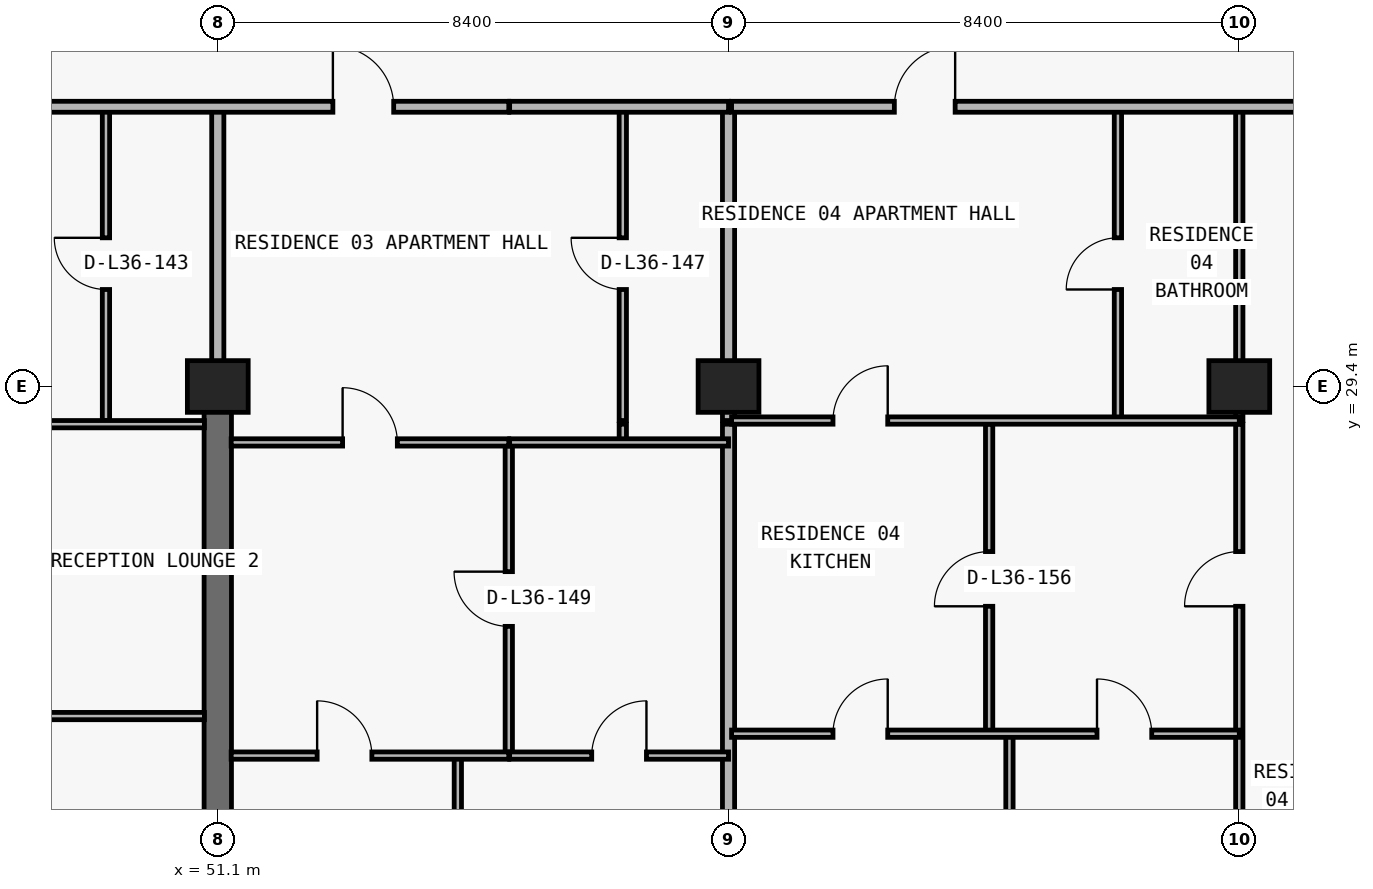
"""IFC4 building model, lengths in metres.
Left out: names, types, materials, properties, quantities, classifications, styles, units other than length and angle.
Written with IfcOpenShell. Run it as: python <this file> out.ifc"""

import sys

from ifc_helpers import new_model, si_unit, direction, frame, frame_2d, origin, origin_2d, place, context, subcontext, project, spatial, rectangle, extrude, element, fill, save


model = new_model("IFC4")
c1 = context("Model", 3, precision=1e-05, world=origin(), true_north=direction((0.0, 1.0)))
c2 = subcontext(c1, "Body", "Model", "MODEL_VIEW")
j1 = project(units=[si_unit("LENGTHUNIT", "METRE"), si_unit("PLANEANGLEUNIT", "RADIAN")], contexts=[c1])
p1 = place(None, origin())
s1 = spatial("IfcSite", under=j1, at=p1, CompositionType="ELEMENT")
p2 = place(p1, origin())
s2 = spatial("IfcBuilding", under=s1, at=p2, CompositionType="ELEMENT")
p3 = place(p2, frame((0.0, 0.0, 132.3)))
s3 = spatial("IfcBuildingStorey", under=s2, at=p3, CompositionType="ELEMENT", Elevation=132.3)
for number, where, z_axis, x_axis in (
    (1, (51.1, 29.4, 0.0), (0.0, 0.0, 1.0), (1.0, 0.0, 0.0)),
    (2, (59.5, 29.4, 0.0), (0.0, 0.0, 1.0), (1.0, 0.0, 0.0)),
    (3, (67.9, 29.4, 0.0), (0.0, 0.0, 1.0), (1.0, 0.0, 0.0)),
):
    element("IfcColumn", number, at=place(p3, frame(where, z_axis=z_axis, x_axis=x_axis)), inside=s3, PredefinedType="COLUMN", context=c2, shape_type="SweptSolid", body=[
        extrude(rectangle(XDim=1.0, YDim=0.85, at=origin_2d()), origin(), (0.0, 0.0, 1.0), 3.05),
    ])
p4 = place(p3, frame((51.1, 20.8, 0.0), z_axis=(0.0, 0.0, 1.0), x_axis=(0.0, 1.0, 0.0)))
e4 = element("IfcWall", 4, at=p4, inside=s3, PredefinedType="SHEAR", context=c2, shape_type="SweptSolid", body=[
    extrude(rectangle(XDim=8.6, YDim=0.45, at=frame_2d((4.3, 0.0))), origin(), (0.0, 0.0, 1.0), 3.05),
])
p5 = place(p3, frame((49.261, 28.84, 0.0), z_axis=(0.0, 0.0, 1.0), x_axis=(0.0, 1.0, 0.0)))
e5 = element("IfcWall", 5, at=p5, inside=s3, PredefinedType="PARTITIONING", context=c2, shape_type="SweptSolid", body=[
    extrude(rectangle(XDim=5.16, YDim=0.12, at=frame_2d((2.58, 0.0))), origin(), (0.0, 0.0, 1.0), 3.05),
])
p6 = place(p5, frame((2.155, 0.0, 0.0)))
e6 = element("IfcOpeningElement", 6, at=p6, cuts=e5, PredefinedType="OPENING", context=c2, shape_type="SweptSolid", body=[
    extrude(rectangle(XDim=0.85, YDim=2.1, at=frame_2d((0.425, 1.05))), frame((0.0, 0.07, 0.0), z_axis=(0.0, -1.0, 0.0), x_axis=(1.0, 0.0, 0.0)), (0.0, 0.0, 1.0), 0.14),
])
p7 = place(p3, frame((51.1, 29.405, 0.0), z_axis=(0.0, 0.0, 1.0), x_axis=(0.0, 1.0, 0.0)))
e7 = element("IfcWall", 7, at=p7, inside=s3, PredefinedType="PARTITIONING", context=c2, shape_type="SweptSolid", body=[
    extrude(rectangle(XDim=4.595, YDim=0.2, at=frame_2d((2.297, 0.0))), origin(), (0.0, 0.0, 1.0), 2.335),
])
p8 = place(p3, frame((55.048, 8.84, 0.0), z_axis=(0.0, 0.0, 1.0), x_axis=(0.0, 1.0, 0.0)))
e8 = element("IfcWall", 8, at=p8, inside=s3, PredefinedType="PARTITIONING", context=c2, shape_type="SweptSolid", body=[
    extrude(rectangle(XDim=14.49, YDim=0.12, at=frame_2d((7.245, 0.0))), origin(), (0.0, 0.0, 1.0), 3.05),
])
p9 = place(p3, frame((55.886, 23.33, 0.0), z_axis=(0.0, 0.0, 1.0), x_axis=(0.0, 1.0, 0.0)))
e9 = element("IfcWall", 9, at=p9, inside=s3, PredefinedType="PARTITIONING", context=c2, shape_type="SweptSolid", body=[
    extrude(rectangle(XDim=5.15, YDim=0.12, at=frame_2d((2.575, 0.0))), origin(), (0.0, 0.0, 1.0), 3.05),
])
p10 = place(p9, frame((2.125, 0.0, 0.0)))
e10 = element("IfcOpeningElement", 10, at=p10, cuts=e9, PredefinedType="OPENING", context=c2, shape_type="SweptSolid", body=[
    extrude(rectangle(XDim=0.9, YDim=2.15, at=frame_2d((0.45, 1.075))), frame((0.0, 0.07, 0.0), z_axis=(0.0, -1.0, 0.0), x_axis=(1.0, 0.0, 0.0)), (0.0, 0.0, 1.0), 0.14),
])
p11 = place(p3, frame((57.761, 28.48, 0.0), z_axis=(0.0, 0.0, 1.0), x_axis=(0.0, 1.0, 0.0)))
e11 = element("IfcWall", 11, at=p11, inside=s3, PredefinedType="PARTITIONING", context=c2, shape_type="SweptSolid", body=[
    extrude(rectangle(XDim=0.3, YDim=0.12, at=frame_2d((0.15, 0.0))), origin(), (0.0, 0.0, 1.0), 3.05),
])
p12 = place(p3, frame((57.761, 28.84, 0.0), z_axis=(0.0, 0.0, 1.0), x_axis=(0.0, 1.0, 0.0)))
e12 = element("IfcWall", 12, at=p12, inside=s3, PredefinedType="PARTITIONING", context=c2, shape_type="SweptSolid", body=[
    extrude(rectangle(XDim=5.16, YDim=0.12, at=frame_2d((2.58, 0.0))), origin(), (0.0, 0.0, 1.0), 3.05),
])
p13 = place(p12, frame((2.155, 0.0, 0.0)))
e13 = element("IfcOpeningElement", 13, at=p13, cuts=e12, PredefinedType="OPENING", context=c2, shape_type="SweptSolid", body=[
    extrude(rectangle(XDim=0.85, YDim=2.1, at=frame_2d((0.425, 1.05))), frame((0.0, 0.07, 0.0), z_axis=(0.0, -1.0, 0.0), x_axis=(1.0, 0.0, 0.0)), (0.0, 0.0, 1.0), 0.14),
])
p14 = place(p3, frame((59.5, 8.84, 0.0), z_axis=(0.0, 0.0, 1.0), x_axis=(0.0, 1.0, 0.0)))
e14 = element("IfcWall", 14, at=p14, inside=s3, PredefinedType="PARTITIONING", context=c2, shape_type="SweptSolid", body=[
    extrude(rectangle(XDim=19.94, YDim=0.2, at=frame_2d((9.97, 0.0))), origin(), (0.0, 0.0, 1.0), 2.174),
])
p15 = place(p3, frame((59.5, 28.84, 0.0), z_axis=(0.0, 0.0, 1.0), x_axis=(0.0, 1.0, 0.0)))
e15 = element("IfcWall", 15, at=p15, inside=s3, PredefinedType="PARTITIONING", context=c2, shape_type="SweptSolid", body=[
    extrude(rectangle(XDim=5.16, YDim=0.2, at=frame_2d((2.58, 0.0))), origin(), (0.0, 0.0, 1.0), 2.174),
])
p16 = place(p3, frame((63.786, 23.69, 0.0), z_axis=(0.0, 0.0, 1.0), x_axis=(0.0, 1.0, 0.0)))
e16 = element("IfcWall", 16, at=p16, inside=s3, PredefinedType="PARTITIONING", context=c2, shape_type="SweptSolid", body=[
    extrude(rectangle(XDim=5.09, YDim=0.12, at=frame_2d((2.545, 0.0))), origin(), (0.0, 0.0, 1.0), 3.05),
])
p17 = place(p16, frame((2.095, 0.0, 0.0)))
e17 = element("IfcOpeningElement", 17, at=p17, cuts=e16, PredefinedType="OPENING", context=c2, shape_type="SweptSolid", body=[
    extrude(rectangle(XDim=0.9, YDim=2.15, at=frame_2d((0.45, 1.075))), frame((0.0, 0.07, 0.0), z_axis=(0.0, -1.0, 0.0), x_axis=(1.0, 0.0, 0.0)), (0.0, 0.0, 1.0), 0.14),
])
p18 = place(p3, frame((64.12, 8.84, 0.0), z_axis=(0.0, 0.0, 1.0), x_axis=(0.0, 1.0, 0.0)))
e18 = element("IfcWall", 18, at=p18, inside=s3, PredefinedType="PARTITIONING", context=c2, shape_type="SweptSolid", body=[
    extrude(rectangle(XDim=14.85, YDim=0.12, at=frame_2d((7.425, 0.0))), origin(), (0.0, 0.0, 1.0), 3.05),
])
p19 = place(p3, frame((65.904, 28.84, 0.0), z_axis=(0.0, 0.0, 1.0), x_axis=(0.0, 1.0, 0.0)))
e19 = element("IfcWall", 19, at=p19, inside=s3, PredefinedType="PARTITIONING", context=c2, shape_type="SweptSolid", body=[
    extrude(rectangle(XDim=5.16, YDim=0.12, at=frame_2d((2.58, 0.0))), origin(), (0.0, 0.0, 1.0), 3.05),
])
p20 = place(p19, frame((2.155, 0.0, 0.0)))
e20 = element("IfcOpeningElement", 20, at=p20, cuts=e19, PredefinedType="OPENING", context=c2, shape_type="SweptSolid", body=[
    extrude(rectangle(XDim=0.85, YDim=2.1, at=frame_2d((0.425, 1.05))), frame((0.0, 0.07, 0.0), z_axis=(0.0, -1.0, 0.0), x_axis=(1.0, 0.0, 0.0)), (0.0, 0.0, 1.0), 0.14),
])
p21 = place(p3, frame((67.9, 8.84, 0.0), z_axis=(0.0, 0.0, 1.0), x_axis=(0.0, 1.0, 0.0)))
e21 = element("IfcWall", 21, at=p21, inside=s3, PredefinedType="PARTITIONING", context=c2, shape_type="SweptSolid", body=[
    extrude(rectangle(XDim=19.94, YDim=0.12, at=frame_2d((9.97, 0.0))), origin(), (0.0, 0.0, 1.0), 2.174),
])
p22 = place(p21, frame((16.945, 0.0, 0.0)))
e22 = element("IfcOpeningElement", 22, at=p22, cuts=e21, PredefinedType="OPENING", context=c2, shape_type="SweptSolid", body=[
    extrude(rectangle(XDim=0.9, YDim=2.124, at=frame_2d((0.45, 1.062))), frame((0.0, 0.07, 0.0), z_axis=(0.0, -1.0, 0.0), x_axis=(1.0, 0.0, 0.0)), (0.0, 0.0, 1.0), 0.14),
])
p23 = place(p3, frame((67.9, 28.84, 0.0), z_axis=(0.0, 0.0, 1.0), x_axis=(0.0, 1.0, 0.0)))
e23 = element("IfcWall", 23, at=p23, inside=s3, PredefinedType="PARTITIONING", context=c2, shape_type="SweptSolid", body=[
    extrude(rectangle(XDim=5.16, YDim=0.12, at=frame_2d((2.58, 0.0))), origin(), (0.0, 0.0, 1.0), 2.174),
])
p24 = place(p3, frame((51.32, 23.33, 0.0), z_axis=(0.0, 0.0, 1.0), x_axis=(1.0, 0.0, 0.0)))
e24 = element("IfcWall", 24, at=p24, inside=s3, PredefinedType="PARTITIONING", context=c2, shape_type="SweptSolid", body=[
    extrude(rectangle(XDim=4.566, YDim=0.12, at=frame_2d((2.283, 0.0))), origin(), (0.0, 0.0, 1.0), 3.05),
])
p25 = place(p24, frame((1.414, 0.0, 0.0)))
e25 = element("IfcOpeningElement", 25, at=p25, cuts=e24, PredefinedType="OPENING", context=c2, shape_type="SweptSolid", body=[
    extrude(rectangle(XDim=0.9, YDim=2.15, at=frame_2d((0.45, 1.075))), frame((0.0, 0.07, 0.0), z_axis=(0.0, -1.0, 0.0), x_axis=(1.0, 0.0, 0.0)), (0.0, 0.0, 1.0), 0.14),
])
p26 = place(p3, frame((55.9, 23.33, 0.0), z_axis=(0.0, 0.0, 1.0), x_axis=(1.0, 0.0, 0.0)))
e26 = element("IfcWall", 26, at=p26, inside=s3, PredefinedType="PARTITIONING", context=c2, shape_type="SweptSolid", body=[
    extrude(rectangle(XDim=3.6, YDim=0.12, at=frame_2d((1.8, 0.0))), origin(), (0.0, 0.0, 1.0), 3.05),
])
p27 = place(p26, frame((1.35, 0.0, 0.0)))
e27 = element("IfcOpeningElement", 27, at=p27, cuts=e26, PredefinedType="OPENING", context=c2, shape_type="SweptSolid", body=[
    extrude(rectangle(XDim=0.9, YDim=2.15, at=frame_2d((0.45, 1.075))), frame((0.0, 0.07, 0.0), z_axis=(0.0, -1.0, 0.0), x_axis=(1.0, 0.0, 0.0)), (0.0, 0.0, 1.0), 0.14),
])
p28 = place(p3, frame((59.55, 23.69, 0.0), z_axis=(0.0, 0.0, 1.0), x_axis=(1.0, 0.0, 0.0)))
e28 = element("IfcWall", 28, at=p28, inside=s3, PredefinedType="PARTITIONING", context=c2, shape_type="SweptSolid", body=[
    extrude(rectangle(XDim=8.35, YDim=0.12, at=frame_2d((4.175, 0.0))), origin(), (0.0, 0.0, 1.0), 3.05),
])
p29 = place(p28, frame((1.668, 0.0, 0.0)))
e29 = element("IfcOpeningElement", 29, at=p29, cuts=e28, PredefinedType="OPENING", context=c2, shape_type="SweptSolid", body=[
    extrude(rectangle(XDim=0.9, YDim=2.15, at=frame_2d((0.45, 1.075))), frame((0.0, 0.07, 0.0), z_axis=(0.0, -1.0, 0.0), x_axis=(1.0, 0.0, 0.0)), (0.0, 0.0, 1.0), 0.14),
])
p30 = place(p28, frame((6.01, 0.0, 0.0)))
e30 = element("IfcOpeningElement", 30, at=p30, cuts=e28, PredefinedType="OPENING", context=c2, shape_type="SweptSolid", body=[
    extrude(rectangle(XDim=0.9, YDim=2.15, at=frame_2d((0.45, 1.075))), frame((0.0, 0.07, 0.0), z_axis=(0.0, -1.0, 0.0), x_axis=(1.0, 0.0, 0.0)), (0.0, 0.0, 1.0), 0.14),
])
p31 = place(p3, frame((42.7, 23.98, 0.0), z_axis=(0.0, 0.0, 1.0), x_axis=(1.0, 0.0, 0.0)))
e31 = element("IfcWall", 31, at=p31, inside=s3, PredefinedType="PARTITIONING", context=c2, shape_type="SweptSolid", body=[
    extrude(rectangle(XDim=8.18, YDim=0.12, at=frame_2d((4.09, 0.0))), origin(), (0.0, 0.0, 1.0), 3.05),
])
p32 = place(p31, frame((3.64, 0.0, 0.0)))
e32 = element("IfcOpeningElement", 32, at=p32, cuts=e31, PredefinedType="OPENING", context=c2, shape_type="SweptSolid", body=[
    extrude(rectangle(XDim=0.9, YDim=2.15, at=frame_2d((0.45, 1.075))), frame((0.0, 0.07, 0.0), z_axis=(0.0, -1.0, 0.0), x_axis=(1.0, 0.0, 0.0)), (0.0, 0.0, 1.0), 0.14),
])
p33 = place(p3, frame((51.32, 28.48, 0.0), z_axis=(0.0, 0.0, 1.0), x_axis=(1.0, 0.0, 0.0)))
e33 = element("IfcWall", 33, at=p33, inside=s3, PredefinedType="PARTITIONING", context=c2, shape_type="SweptSolid", body=[
    extrude(rectangle(XDim=4.566, YDim=0.12, at=frame_2d((2.283, 0.0))), origin(), (0.0, 0.0, 1.0), 3.05),
])
p34 = place(p33, frame((1.833, 0.0, 0.0)))
e34 = element("IfcOpeningElement", 34, at=p34, cuts=e33, PredefinedType="OPENING", context=c2, shape_type="SweptSolid", body=[
    extrude(rectangle(XDim=0.9, YDim=2.15, at=frame_2d((0.45, 1.075))), frame((0.0, 0.07, 0.0), z_axis=(0.0, -1.0, 0.0), x_axis=(1.0, 0.0, 0.0)), (0.0, 0.0, 1.0), 0.14),
])
p35 = place(p3, frame((55.9, 28.48, 0.0), z_axis=(0.0, 0.0, 1.0), x_axis=(1.0, 0.0, 0.0)))
e35 = element("IfcWall", 35, at=p35, inside=s3, PredefinedType="PARTITIONING", context=c2, shape_type="SweptSolid", body=[
    extrude(rectangle(XDim=3.6, YDim=0.12, at=frame_2d((1.8, 0.0))), origin(), (0.0, 0.0, 1.0), 3.05),
])
p36 = place(p3, frame((42.7, 28.78, 0.0), z_axis=(0.0, 0.0, 1.0), x_axis=(1.0, 0.0, 0.0)))
e36 = element("IfcWall", 36, at=p36, inside=s3, PredefinedType="PARTITIONING", context=c2, shape_type="SweptSolid", body=[
    extrude(rectangle(XDim=8.18, YDim=0.12, at=frame_2d((4.09, 0.0))), origin(), (0.0, 0.0, 1.0), 3.05),
])
p37 = place(p36, frame((2.831, 0.0, 0.0)))
e37 = element("IfcOpeningElement", 37, at=p37, cuts=e36, PredefinedType="OPENING", context=c2, shape_type="SweptSolid", body=[
    extrude(rectangle(XDim=0.9, YDim=2.15, at=frame_2d((0.45, 1.075))), frame((0.0, 0.07, 0.0), z_axis=(0.0, -1.0, 0.0), x_axis=(1.0, 0.0, 0.0)), (0.0, 0.0, 1.0), 0.14),
])
p38 = place(p3, frame((59.55, 28.84, 0.0), z_axis=(0.0, 0.0, 1.0), x_axis=(1.0, 0.0, 0.0)))
e38 = element("IfcWall", 38, at=p38, inside=s3, PredefinedType="PARTITIONING", context=c2, shape_type="SweptSolid", body=[
    extrude(rectangle(XDim=8.35, YDim=0.12, at=frame_2d((4.175, 0.0))), origin(), (0.0, 0.0, 1.0), 3.05),
])
p39 = place(p38, frame((1.668, 0.0, 0.0)))
e39 = element("IfcOpeningElement", 39, at=p39, cuts=e38, PredefinedType="OPENING", context=c2, shape_type="SweptSolid", body=[
    extrude(rectangle(XDim=0.9, YDim=2.15, at=frame_2d((0.45, 1.075))), frame((0.0, 0.07, 0.0), z_axis=(0.0, -1.0, 0.0), x_axis=(1.0, 0.0, 0.0)), (0.0, 0.0, 1.0), 0.14),
])
p40 = place(p3, frame((18.3, 34.0, 0.0), z_axis=(0.0, 0.0, 1.0), x_axis=(1.0, 0.0, 0.0)))
e40 = element("IfcWall", 40, at=p40, inside=s3, PredefinedType="PARTITIONING", context=c2, shape_type="SweptSolid", body=[
    extrude(rectangle(XDim=37.586, YDim=0.18, at=frame_2d((18.793, 0.0))), origin(), (0.0, 0.0, 1.0), 3.05),
])
p41 = place(p40, frame((11.162, 0.0, 0.0)))
e41 = element("IfcOpeningElement", 41, at=p41, cuts=e40, PredefinedType="OPENING", context=c2, shape_type="SweptSolid", body=[
    extrude(rectangle(XDim=1.0, YDim=2.2, at=frame_2d((0.5, 1.1))), frame((0.0, 0.1, 0.0), z_axis=(0.0, -1.0, 0.0), x_axis=(1.0, 0.0, 0.0)), (0.0, 0.0, 1.0), 0.2),
])
p42 = place(p40, frame((34.693, 0.0, 0.0)))
e42 = element("IfcOpeningElement", 42, at=p42, cuts=e40, PredefinedType="OPENING", context=c2, shape_type="SweptSolid", body=[
    extrude(rectangle(XDim=1.0, YDim=2.2, at=frame_2d((0.5, 1.1))), frame((0.0, 0.1, 0.0), z_axis=(0.0, -1.0, 0.0), x_axis=(1.0, 0.0, 0.0)), (0.0, 0.0, 1.0), 0.2),
])
p43 = place(p3, frame((55.9, 34.0, 0.0), z_axis=(0.0, 0.0, 1.0), x_axis=(1.0, 0.0, 0.0)))
e43 = element("IfcWall", 43, at=p43, inside=s3, PredefinedType="PARTITIONING", context=c2, shape_type="SweptSolid", body=[
    extrude(rectangle(XDim=3.6, YDim=0.18, at=frame_2d((1.8, 0.0))), origin(), (0.0, 0.0, 1.0), 3.05),
])
p44 = place(p3, frame((59.55, 34.0, 0.0), z_axis=(0.0, 0.0, 1.0), x_axis=(1.0, 0.0, 0.0)))
e44 = element("IfcWall", 44, at=p44, inside=s3, PredefinedType="PARTITIONING", context=c2, shape_type="SweptSolid", body=[
    extrude(rectangle(XDim=10.55, YDim=0.18, at=frame_2d((5.275, 0.0))), origin(), (0.0, 0.0, 1.0), 3.05),
])
p45 = place(p44, frame((2.677, 0.0, 0.0)))
e45 = element("IfcOpeningElement", 45, at=p45, cuts=e44, PredefinedType="OPENING", context=c2, shape_type="SweptSolid", body=[
    extrude(rectangle(XDim=1.0, YDim=2.2, at=frame_2d((0.5, 1.1))), frame((0.0, 0.1, 0.0), z_axis=(0.0, -1.0, 0.0), x_axis=(1.0, 0.0, 0.0)), (0.0, 0.0, 1.0), 0.2),
])
p46 = place(p6, origin())
e46 = element("IfcDoor", 46, at=p46, inside=s3, OperationType="SINGLE_SWING_RIGHT", PredefinedType="DOOR", context=c2, shape_type="SweptSolid", body=[
    extrude(rectangle(XDim=0.85, YDim=2.1, at=frame_2d((0.425, 1.05))), frame((0.0, 0.025, 0.0), z_axis=(0.0, -1.0, 0.0), x_axis=(1.0, 0.0, 0.0)), (0.0, 0.0, 1.0), 0.05),
])
fill(e6, e46)
p47 = place(p42, origin())
e47 = element("IfcDoor", 47, at=p47, inside=s3, OperationType="SINGLE_SWING_LEFT", PredefinedType="DOOR", context=c2, shape_type="SweptSolid", body=[
    extrude(rectangle(XDim=1.0, YDim=2.2, at=frame_2d((0.5, 1.1))), frame((0.0, 0.025, 0.0), z_axis=(0.0, -1.0, 0.0), x_axis=(1.0, 0.0, 0.0)), (0.0, 0.0, 1.0), 0.05),
])
fill(e42, e47)
p48 = place(p13, origin())
e48 = element("IfcDoor", 48, at=p48, inside=s3, OperationType="SINGLE_SWING_RIGHT", PredefinedType="DOOR", context=c2, shape_type="SweptSolid", body=[
    extrude(rectangle(XDim=0.85, YDim=2.1, at=frame_2d((0.425, 1.05))), frame((0.0, 0.025, 0.0), z_axis=(0.0, -1.0, 0.0), x_axis=(1.0, 0.0, 0.0)), (0.0, 0.0, 1.0), 0.05),
])
fill(e13, e48)
p49 = place(p34, origin())
e49 = element("IfcDoor", 49, at=p49, inside=s3, OperationType="SINGLE_SWING_LEFT", PredefinedType="DOOR", context=c2, shape_type="SweptSolid", body=[
    extrude(rectangle(XDim=0.9, YDim=2.15, at=frame_2d((0.45, 1.075))), frame((0.0, 0.025, 0.0), z_axis=(0.0, -1.0, 0.0), x_axis=(1.0, 0.0, 0.0)), (0.0, 0.0, 1.0), 0.05),
])
fill(e34, e49)
p50 = place(p10, origin())
e50 = element("IfcDoor", 50, at=p50, inside=s3, OperationType="SINGLE_SWING_RIGHT", PredefinedType="DOOR", context=c2, shape_type="SweptSolid", body=[
    extrude(rectangle(XDim=0.9, YDim=2.15, at=frame_2d((0.45, 1.075))), frame((0.0, 0.025, 0.0), z_axis=(0.0, -1.0, 0.0), x_axis=(1.0, 0.0, 0.0)), (0.0, 0.0, 1.0), 0.05),
])
fill(e10, e50)
p51 = place(p25, origin())
e51 = element("IfcDoor", 51, at=p51, inside=s3, OperationType="SINGLE_SWING_LEFT", PredefinedType="DOOR", context=c2, shape_type="SweptSolid", body=[
    extrude(rectangle(XDim=0.9, YDim=2.15, at=frame_2d((0.45, 1.075))), frame((0.0, 0.025, 0.0), z_axis=(0.0, -1.0, 0.0), x_axis=(1.0, 0.0, 0.0)), (0.0, 0.0, 1.0), 0.05),
])
fill(e25, e51)
p52 = place(p27, origin())
e52 = element("IfcDoor", 52, at=p52, inside=s3, OperationType="SINGLE_SWING_RIGHT", PredefinedType="DOOR", context=c2, shape_type="SweptSolid", body=[
    extrude(rectangle(XDim=0.9, YDim=2.15, at=frame_2d((0.45, 1.075))), frame((0.0, 0.025, 0.0), z_axis=(0.0, -1.0, 0.0), x_axis=(1.0, 0.0, 0.0)), (0.0, 0.0, 1.0), 0.05),
])
fill(e27, e52)
p53 = place(p45, origin())
e53 = element("IfcDoor", 53, at=p53, inside=s3, OperationType="SINGLE_SWING_RIGHT", PredefinedType="DOOR", context=c2, shape_type="SweptSolid", body=[
    extrude(rectangle(XDim=1.0, YDim=2.2, at=frame_2d((0.5, 1.1))), frame((0.0, 0.025, 0.0), z_axis=(0.0, -1.0, 0.0), x_axis=(1.0, 0.0, 0.0)), (0.0, 0.0, 1.0), 0.05),
])
fill(e45, e53)
p54 = place(p20, origin())
e54 = element("IfcDoor", 54, at=p54, inside=s3, OperationType="SINGLE_SWING_LEFT", PredefinedType="DOOR", context=c2, shape_type="SweptSolid", body=[
    extrude(rectangle(XDim=0.85, YDim=2.1, at=frame_2d((0.425, 1.05))), frame((0.0, 0.025, 0.0), z_axis=(0.0, -1.0, 0.0), x_axis=(1.0, 0.0, 0.0)), (0.0, 0.0, 1.0), 0.05),
])
fill(e20, e54)
p55 = place(p39, origin())
e55 = element("IfcDoor", 55, at=p55, inside=s3, OperationType="SINGLE_SWING_RIGHT", PredefinedType="DOOR", context=c2, shape_type="SweptSolid", body=[
    extrude(rectangle(XDim=0.9, YDim=2.15, at=frame_2d((0.45, 1.075))), frame((0.0, 0.025, 0.0), z_axis=(0.0, -1.0, 0.0), x_axis=(1.0, 0.0, 0.0)), (0.0, 0.0, 1.0), 0.05),
])
fill(e39, e55)
p56 = place(p17, origin())
e56 = element("IfcDoor", 56, at=p56, inside=s3, OperationType="SINGLE_SWING_LEFT", PredefinedType="DOOR", context=c2, shape_type="SweptSolid", body=[
    extrude(rectangle(XDim=0.9, YDim=2.15, at=frame_2d((0.45, 1.075))), frame((0.0, 0.025, 0.0), z_axis=(0.0, -1.0, 0.0), x_axis=(1.0, 0.0, 0.0)), (0.0, 0.0, 1.0), 0.05),
])
fill(e17, e56)
p57 = place(p29, origin())
e57 = element("IfcDoor", 57, at=p57, inside=s3, OperationType="SINGLE_SWING_RIGHT", PredefinedType="DOOR", context=c2, shape_type="SweptSolid", body=[
    extrude(rectangle(XDim=0.9, YDim=2.15, at=frame_2d((0.45, 1.075))), frame((0.0, 0.025, 0.0), z_axis=(0.0, -1.0, 0.0), x_axis=(1.0, 0.0, 0.0)), (0.0, 0.0, 1.0), 0.05),
])
fill(e29, e57)
p58 = place(p30, origin())
e58 = element("IfcDoor", 58, at=p58, inside=s3, OperationType="SINGLE_SWING_LEFT", PredefinedType="DOOR", context=c2, shape_type="SweptSolid", body=[
    extrude(rectangle(XDim=0.9, YDim=2.15, at=frame_2d((0.45, 1.075))), frame((0.0, 0.025, 0.0), z_axis=(0.0, -1.0, 0.0), x_axis=(1.0, 0.0, 0.0)), (0.0, 0.0, 1.0), 0.05),
])
fill(e30, e58)
p59 = place(p22, origin())
e59 = element("IfcDoor", 59, at=p59, inside=s3, OperationType="SINGLE_SWING_LEFT", PredefinedType="DOOR", context=c2, shape_type="SweptSolid", body=[
    extrude(rectangle(XDim=0.9, YDim=2.124, at=frame_2d((0.45, 1.062))), frame((0.0, 0.025, 0.0), z_axis=(0.0, -1.0, 0.0), x_axis=(1.0, 0.0, 0.0)), (0.0, 0.0, 1.0), 0.05),
])
fill(e22, e59)
save(model, sys.argv[1])
